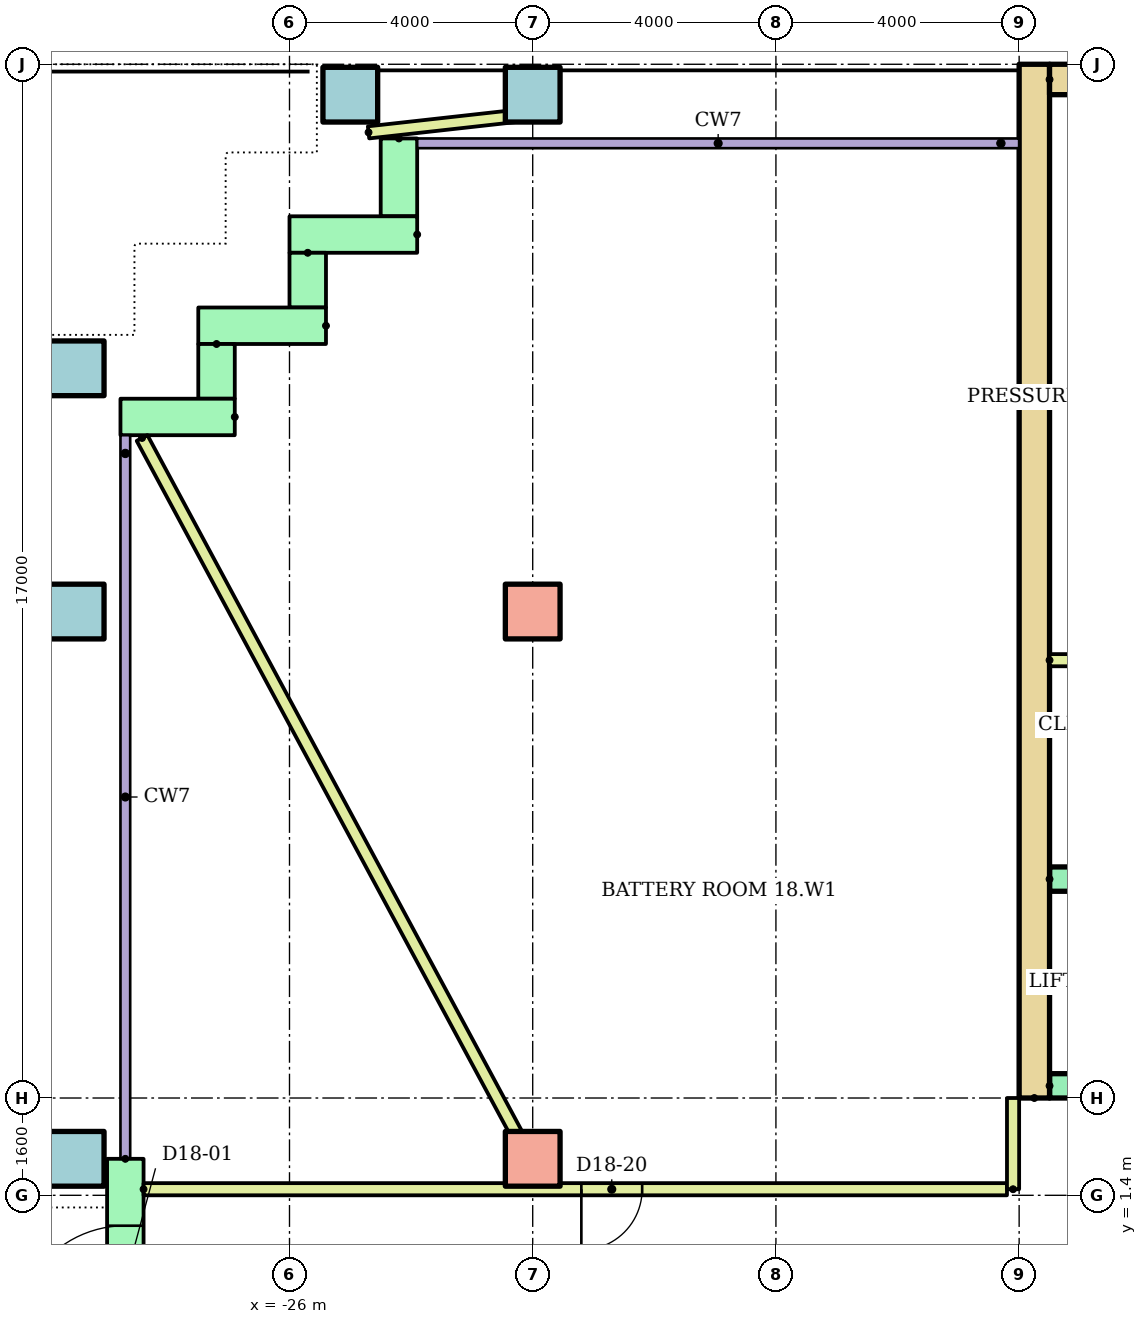
"""IFC4 building model, lengths in metres.
Left out: names, types, materials, properties, quantities, classifications, styles, units other than length and angle.
Written with IfcOpenShell. Run it as: python <this file> out.ifc"""

import sys

from ifc_helpers import new_model, si_unit, direction, frame, frame_2d, origin, origin_2d, place, context, subcontext, project, spatial, rectangle, hollow_rectangle, extrude, element, fill, save


model = new_model("IFC4")
c1 = context("Model", 3, precision=1e-05, world=origin(), true_north=direction((0.0, 1.0)))
c2 = subcontext(c1, "Body", "Model", "MODEL_VIEW")
j1 = project(units=[si_unit("LENGTHUNIT", "METRE"), si_unit("PLANEANGLEUNIT", "RADIAN")], contexts=[c1])
p1 = place(None, origin())
s1 = spatial("IfcSite", under=j1, at=p1, CompositionType="ELEMENT")
p2 = place(p1, origin())
s2 = spatial("IfcBuilding", under=s1, at=p2, CompositionType="ELEMENT")
p3 = place(p2, frame((0.0, 0.0, 73.6)))
s3 = spatial("IfcBuildingStorey", under=s2, at=p3, CompositionType="ELEMENT", Elevation=73.6)
p4 = place(p3, frame((-29.5, 2.0, 0.0)))
e1 = element("IfcColumn", 1, at=p4, inside=s3, PredefinedType="COLUMN", context=c2, shape_type="SweptSolid", body=[
    extrude(hollow_rectangle(XDim=0.9, YDim=0.9, WallThickness=0.045, at=origin_2d()), origin(), (0.0, 0.0, 1.0), 3.9),
])
p5 = place(p3, frame((-22.0, 2.0, 0.0)))
e2 = element("IfcColumn", 2, at=p5, inside=s3, PredefinedType="COLUMN", context=c2, shape_type="SweptSolid", body=[
    extrude(rectangle(XDim=0.9, YDim=0.9, at=origin_2d()), origin(), (0.0, 0.0, 1.0), 3.9),
])
p6 = place(p3, frame((-29.5, 11.0, 0.0)))
e3 = element("IfcColumn", 3, at=p6, inside=s3, PredefinedType="COLUMN", context=c2, shape_type="SweptSolid", body=[
    extrude(hollow_rectangle(XDim=0.9, YDim=0.9, WallThickness=0.045, at=origin_2d()), origin(), (0.0, 0.0, 1.0), 3.9),
])
p7 = place(p3, frame((-22.0, 11.0, 0.0)))
e4 = element("IfcColumn", 4, at=p7, inside=s3, PredefinedType="COLUMN", context=c2, shape_type="SweptSolid", body=[
    extrude(rectangle(XDim=0.9, YDim=0.9, at=origin_2d()), origin(), (0.0, 0.0, 1.0), 3.9),
])
for number, where in (
    (5, (-29.5, 15.0, 0.0)),
    (6, (-25.0, 19.5, 0.0)),
    (7, (-22.0, 19.5, 0.0)),
):
    element("IfcColumn", number, at=place(p3, frame(where)), inside=s3, PredefinedType="COLUMN", context=c2, shape_type="SweptSolid", body=[
        extrude(hollow_rectangle(XDim=0.9, YDim=0.9, WallThickness=0.045, at=origin_2d()), origin(), (0.0, 0.0, 1.0), 3.9),
    ])
p8 = place(p3, frame((-24.2, 18.78, 0.0), z_axis=(0.0, 0.0, 1.0), x_axis=(0.0, -1.0, 0.0)))
e8 = element("IfcWall", 8, at=p8, inside=s3, PredefinedType="STANDARD", context=c2, shape_type="SweptSolid", body=[
    extrude(rectangle(XDim=1.28, YDim=0.6, at=frame_2d((0.64, 0.0))), origin(), (0.0, 0.0, 1.0), 3.62),
])
p9 = place(p3, frame((-23.9, 17.2, 0.0), z_axis=(0.0, 0.0, 1.0), x_axis=(-1.0, 0.0, 0.0)))
e9 = element("IfcWall", 9, at=p9, inside=s3, PredefinedType="STANDARD", context=c2, shape_type="SweptSolid", body=[
    extrude(rectangle(XDim=2.1, YDim=0.6, at=frame_2d((1.05, 0.0))), origin(), (0.0, 0.0, 1.0), 3.62),
])
p10 = place(p3, frame((-25.7, 16.9, 0.0), z_axis=(0.0, 0.0, 1.0), x_axis=(0.0, -1.0, 0.0)))
e10 = element("IfcWall", 10, at=p10, inside=s3, PredefinedType="STANDARD", context=c2, shape_type="SweptSolid", body=[
    extrude(rectangle(XDim=0.9, YDim=0.6, at=frame_2d((0.45, 0.0))), origin(), (0.0, 0.0, 1.0), 3.62),
])
p11 = place(p3, frame((-25.4, 15.7, 0.0), z_axis=(0.0, 0.0, 1.0), x_axis=(-1.0, 0.0, 0.0)))
e11 = element("IfcWall", 11, at=p11, inside=s3, PredefinedType="STANDARD", context=c2, shape_type="SweptSolid", body=[
    extrude(rectangle(XDim=2.1, YDim=0.6, at=frame_2d((1.05, 0.0))), origin(), (0.0, 0.0, 1.0), 3.62),
])
p12 = place(p3, frame((-27.2, 15.4, 0.0), z_axis=(0.0, 0.0, 1.0), x_axis=(0.0, -1.0, 0.0)))
e12 = element("IfcWall", 12, at=p12, inside=s3, PredefinedType="STANDARD", context=c2, shape_type="SweptSolid", body=[
    extrude(rectangle(XDim=0.9, YDim=0.6, at=frame_2d((0.45, 0.0))), origin(), (0.0, 0.0, 1.0), 3.62),
])
p13 = place(p3, frame((-26.9, 14.2, 0.0), z_axis=(0.0, 0.0, 1.0), x_axis=(-1.0, 0.0, 0.0)))
e13 = element("IfcWall", 13, at=p13, inside=s3, PredefinedType="STANDARD", context=c2, shape_type="SweptSolid", body=[
    extrude(rectangle(XDim=1.88, YDim=0.6, at=frame_2d((0.94, 0.0))), origin(), (0.0, 0.0, 1.0), 3.62),
])
p14 = place(p3, frame((-28.7, 2.0, 0.0), z_axis=(0.0, 0.0, 1.0), x_axis=(0.0, -1.0, 0.0)))
e14 = element("IfcWall", 14, at=p14, inside=s3, PredefinedType="STANDARD", context=c2, shape_type="SweptSolid", body=[
    extrude(rectangle(XDim=4.0, YDim=0.6, at=frame_2d((2.0, 0.0))), origin(), (0.0, 0.0, 1.0), 3.62),
])
p15 = place(p14, frame((1.1, 0.0, 0.0)))
e15 = element("IfcOpeningElement", 15, at=p15, cuts=e14, PredefinedType="OPENING", context=c2, shape_type="SweptSolid", body=[
    extrude(rectangle(XDim=1.8, YDim=2.1, at=frame_2d((0.9, 1.05))), frame((0.0, 0.31, 0.0), z_axis=(0.0, -1.0, 0.0), x_axis=(1.0, 0.0, 0.0)), (0.0, 0.0, 1.0), 0.62),
])
p16 = place(p3, frame((-13.75, 3.0, 0.0), z_axis=(0.0, 0.0, 1.0), x_axis=(0.0, 1.0, 0.0)))
e16 = element("IfcWall", 16, at=p16, inside=s3, PredefinedType="SHEAR", context=c2, shape_type="SweptSolid", body=[
    extrude(rectangle(XDim=17.0, YDim=0.5, at=frame_2d((8.5, 0.0))), origin(), (0.0, 0.0, 1.0), 3.62),
])
p17 = place(p3, frame((-13.5, 19.75, 0.0)))
e17 = element("IfcWall", 17, at=p17, inside=s3, PredefinedType="SHEAR", context=c2, shape_type="SweptSolid", body=[
    extrude(rectangle(XDim=27.0, YDim=0.5, at=frame_2d((13.5, 0.0))), origin(), (0.0, 0.0, 1.0), 3.62),
])
p18 = place(p3, frame((-13.5, 3.2, 0.0)))
e18 = element("IfcWall", 18, at=p18, inside=s3, PredefinedType="SHEAR", context=c2, shape_type="SweptSolid", body=[
    extrude(rectangle(XDim=27.0, YDim=0.4, at=frame_2d((13.5, 0.0))), origin(), (0.0, 0.0, 1.0), 3.62),
])
p19 = place(p18, frame((6.861, 0.0, 0.0)))
e19 = element("IfcOpeningElement", 19, at=p19, cuts=e18, PredefinedType="OPENING", context=c2, shape_type="SweptSolid", body=[
    extrude(rectangle(XDim=1.1, YDim=2.1, at=frame_2d((0.55, 1.05))), frame((0.0, 0.21, 0.0), z_axis=(0.0, -1.0, 0.0), x_axis=(1.0, 0.0, 0.0)), (0.0, 0.0, 1.0), 0.42),
])
p20 = place(p18, frame((9.906, 0.0, 0.0)))
e20 = element("IfcOpeningElement", 20, at=p20, cuts=e18, PredefinedType="OPENING", context=c2, shape_type="SweptSolid", body=[
    extrude(rectangle(XDim=1.1, YDim=2.1, at=frame_2d((0.55, 1.05))), frame((0.0, 0.21, 0.0), z_axis=(0.0, -1.0, 0.0), x_axis=(1.0, 0.0, 0.0)), (0.0, 0.0, 1.0), 0.42),
])
p21 = place(p18, frame((15.994, 0.0, 0.0)))
e21 = element("IfcOpeningElement", 21, at=p21, cuts=e18, PredefinedType="OPENING", context=c2, shape_type="SweptSolid", body=[
    extrude(rectangle(XDim=1.1, YDim=2.1, at=frame_2d((0.55, 1.05))), frame((0.0, 0.21, 0.0), z_axis=(0.0, -1.0, 0.0), x_axis=(1.0, 0.0, 0.0)), (0.0, 0.0, 1.0), 0.42),
])
p22 = place(p18, frame((19.039, 0.0, 0.0)))
e22 = element("IfcOpeningElement", 22, at=p22, cuts=e18, PredefinedType="OPENING", context=c2, shape_type="SweptSolid", body=[
    extrude(rectangle(XDim=1.1, YDim=2.1, at=frame_2d((0.55, 1.05))), frame((0.0, 0.21, 0.0), z_axis=(0.0, -1.0, 0.0), x_axis=(1.0, 0.0, 0.0)), (0.0, 0.0, 1.0), 0.42),
])
p23 = place(p18, frame((12.6, 0.0, 0.0)))
e23 = element("IfcOpeningElement", 23, at=p23, cuts=e18, PredefinedType="OPENING", context=c2, shape_type="SweptSolid", body=[
    extrude(rectangle(XDim=1.8, YDim=2.1, at=frame_2d((0.9, 1.05))), frame((0.0, 0.21, 0.0), z_axis=(0.0, -1.0, 0.0), x_axis=(1.0, 0.0, 0.0)), (0.0, 0.0, 1.0), 0.42),
])
p24 = place(p3, frame((-13.5, 6.6, 0.0)))
e24 = element("IfcWall", 24, at=p24, inside=s3, PredefinedType="SHEAR", context=c2, shape_type="SweptSolid", body=[
    extrude(rectangle(XDim=11.978, YDim=0.4, at=frame_2d((5.989, 0.0))), origin(), (0.0, 0.0, 1.0), 3.62),
])
p25 = place(p3, frame((-13.5, 10.2, 0.0)))
e25 = element("IfcWall", 25, at=p25, inside=s3, PredefinedType="PARTITIONING", context=c2, shape_type="SweptSolid", body=[
    extrude(rectangle(XDim=3.9, YDim=0.2, at=frame_2d((1.95, 0.0))), origin(), (0.0, 0.0, 1.0), 3.62),
])
p26 = place(p3, frame((-28.4, 1.5, 0.0)))
e26 = element("IfcWall", 26, at=p26, inside=s3, PredefinedType="PARTITIONING", context=c2, shape_type="SweptSolid", body=[
    extrude(rectangle(XDim=14.2, YDim=0.2, at=frame_2d((7.1, 0.0))), origin(), (0.0, 0.0, 1.0), 3.62),
])
p27 = place(p26, frame((7.2, 0.0, 0.0)))
e27 = element("IfcOpeningElement", 27, at=p27, cuts=e26, PredefinedType="OPENING", context=c2, shape_type="SweptSolid", body=[
    extrude(rectangle(XDim=1.0, YDim=2.4, at=frame_2d((0.5, 1.2))), frame((0.0, 0.11, 0.0), z_axis=(0.0, -1.0, 0.0), x_axis=(1.0, 0.0, 0.0)), (0.0, 0.0, 1.0), 0.22),
])
p28 = place(p3, frame((-14.1, 1.5, 0.0), z_axis=(0.0, 0.0, 1.0), x_axis=(0.0, 1.0, 0.0)))
e28 = element("IfcWall", 28, at=p28, inside=s3, PredefinedType="PARTITIONING", context=c2, shape_type="SweptSolid", body=[
    extrude(rectangle(XDim=1.5, YDim=0.2, at=frame_2d((0.75, 0.0))), origin(), (0.0, 0.0, 1.0), 3.62),
])
p29 = place(p3, frame((-24.7, 18.88, 0.0), z_axis=(0.0, 0.0, 1.0), x_axis=(0.993838284659, 0.110839812096, 0.0)))
e29 = element("IfcWall", 29, at=p29, inside=s3, PredefinedType="PARTITIONING", context=c2, shape_type="SweptSolid", body=[
    extrude(rectangle(XDim=2.888, YDim=0.2, at=frame_2d((1.444, 0.0))), origin(), (0.0, 0.0, 1.0), 3.62),
])
p30 = place(p3, frame((-28.425, 13.854, 0.0), z_axis=(0.0, 0.0, 1.0), x_axis=(0.473900322789, -0.88057849398, 0.0)))
e30 = element("IfcWall", 30, at=p30, inside=s3, PredefinedType="PARTITIONING", context=c2, shape_type="SweptSolid", body=[
    extrude(rectangle(XDim=13.866, YDim=0.2, at=frame_2d((6.933, 0.0))), origin(), (0.0, 0.0, 1.0), 3.62),
])
p31 = place(p15, frame((1.8, 0.0, 0.0), z_axis=(0.0, 0.0, 1.0), x_axis=(-1.0, 0.0, 0.0)))
e31 = element("IfcDoor", 31, at=p31, inside=s3, OperationType="DOUBLE_DOOR_SINGLE_SWING", PredefinedType="DOOR", context=c2, shape_type="SweptSolid", body=[
    extrude(rectangle(XDim=1.8, YDim=2.1, at=frame_2d((0.9, 1.05))), frame((0.0, 0.025, 0.0), z_axis=(0.0, -1.0, 0.0), x_axis=(1.0, 0.0, 0.0)), (0.0, 0.0, 1.0), 0.05),
])
fill(e15, e31)
p32 = place(p27, frame((1.0, 0.0, 0.0), z_axis=(0.0, 0.0, 1.0), x_axis=(-1.0, 0.0, 0.0)))
e32 = element("IfcDoor", 32, at=p32, inside=s3, OperationType="SINGLE_SWING_LEFT", PredefinedType="DOOR", context=c2, shape_type="SweptSolid", body=[
    extrude(rectangle(XDim=1.0, YDim=2.4, at=frame_2d((0.5, 1.2))), frame((0.0, 0.025, 0.0), z_axis=(0.0, -1.0, 0.0), x_axis=(1.0, 0.0, 0.0)), (0.0, 0.0, 1.0), 0.05),
])
fill(e27, e32)
save(model, sys.argv[1])
